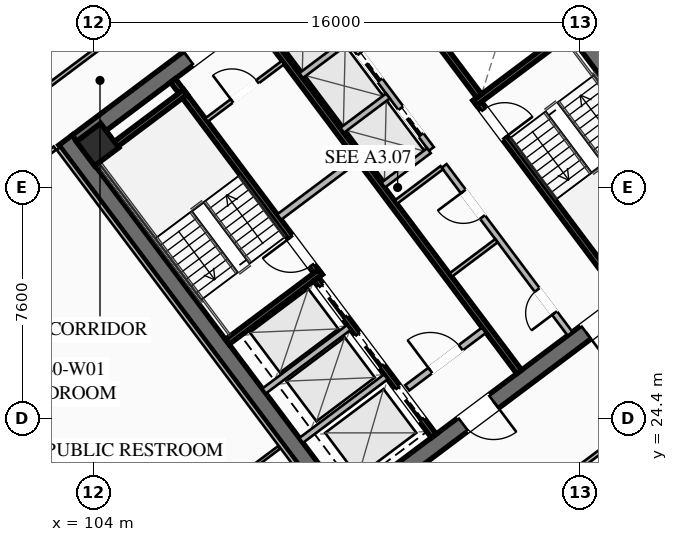
"""IFC4 building model, lengths in metres.
Left out: names, types, materials, properties, quantities, classifications, styles, units other than length and angle.
Written with IfcOpenShell. Run it as: python <this file> out.ifc"""

import sys

from ifc_helpers import new_model, si_unit, direction, frame, frame_2d, origin, origin_2d, place, context, subcontext, project, spatial, rectangle, hollow_rectangle, extrude, element, fill, save


model = new_model("IFC4")
c1 = context("Model", 3, precision=1e-05, world=origin(), true_north=direction((0.0, 1.0)))
c2 = subcontext(c1, "Body", "Model", "MODEL_VIEW")
j1 = project(units=[si_unit("LENGTHUNIT", "METRE"), si_unit("PLANEANGLEUNIT", "RADIAN")], contexts=[c1])
p1 = place(None, origin())
s1 = spatial("IfcSite", under=j1, at=p1, CompositionType="ELEMENT")
p2 = place(p1, origin())
s2 = spatial("IfcBuilding", under=s1, at=p2, CompositionType="ELEMENT")
p3 = place(p2, frame((0.0, 0.0, 149.9)))
s3 = spatial("IfcBuildingStorey", under=s2, at=p3, CompositionType="ELEMENT", Elevation=149.9)
for number, where, z_axis, x_axis in (
    (1, (112.436, 21.077, 0.0), (0.0, 0.0, 1.0), (-0.6, 0.8, 0.0)),
    (2, (115.564, 42.923, 0.0), (0.0, 0.0, 1.0), (0.6, -0.8, 0.0)),
):
    element("IfcWall", number, at=place(p3, frame(where, z_axis=z_axis, x_axis=x_axis)), inside=s3, PredefinedType="SHEAR", context=c2, shape_type="SweptSolid", body=[
        extrude(rectangle(XDim=15.6, YDim=0.55, at=frame_2d((7.8, 0.0))), origin(), (0.0, 0.0, 1.0), 3.55),
    ])
p4 = place(p3, frame((124.539, 30.498, 0.0), z_axis=(0.0, 0.0, 1.0), x_axis=(-0.799998054672, -0.600002593761, 0.0)))
e3 = element("IfcWall", 3, at=p4, inside=s3, PredefinedType="SHEAR", context=c2, shape_type="SweptSolid", body=[
    extrude(rectangle(XDim=15.06, YDim=0.55, at=frame_2d((7.53, 0.0))), origin(), (0.0, 0.0, 1.0), 3.55),
])
p5 = place(p4, frame((9.23, 0.0, 0.0)))
e4 = element("IfcOpeningElement", 4, at=p5, cuts=e3, PredefinedType="OPENING", context=c2, shape_type="SweptSolid", body=[
    extrude(rectangle(XDim=1.25, YDim=2.25, at=frame_2d((0.625, 1.125))), frame((0.0, 0.285, 0.0), z_axis=(0.0, -1.0, 0.0), x_axis=(1.0, 0.0, 0.0)), (0.0, 0.0, 1.0), 0.57),
])
p6 = place(p4, frame((4.18, 0.0, 0.0)))
e5 = element("IfcOpeningElement", 5, at=p6, cuts=e3, PredefinedType="OPENING", context=c2, shape_type="SweptSolid", body=[
    extrude(rectangle(XDim=1.25, YDim=2.25, at=frame_2d((0.625, 1.125))), frame((0.0, 0.285, 0.0), z_axis=(0.0, -1.0, 0.0), x_axis=(1.0, 0.0, 0.0)), (0.0, 0.0, 1.0), 0.57),
])
p7 = place(p3, frame((103.461, 33.502, 0.0), z_axis=(0.0, 0.0, 1.0), x_axis=(0.799998054672, 0.600002593761, 0.0)))
e6 = element("IfcWall", 6, at=p7, inside=s3, PredefinedType="SHEAR", context=c2, shape_type="SweptSolid", body=[
    extrude(rectangle(XDim=15.06, YDim=0.55, at=frame_2d((7.53, 0.0))), origin(), (0.0, 0.0, 1.0), 3.55),
])
p8 = place(p7, frame((4.58, 0.0, 0.0)))
e7 = element("IfcOpeningElement", 7, at=p8, cuts=e6, PredefinedType="OPENING", context=c2, shape_type="SweptSolid", body=[
    extrude(rectangle(XDim=1.25, YDim=2.25, at=frame_2d((0.625, 1.125))), frame((0.0, 0.285, 0.0), z_axis=(0.0, -1.0, 0.0), x_axis=(1.0, 0.0, 0.0)), (0.0, 0.0, 1.0), 0.57),
])
p9 = place(p7, frame((9.63, 0.0, 0.0)))
e8 = element("IfcOpeningElement", 8, at=p9, cuts=e6, PredefinedType="OPENING", context=c2, shape_type="SweptSolid", body=[
    extrude(rectangle(XDim=1.25, YDim=2.25, at=frame_2d((0.625, 1.125))), frame((0.0, 0.285, 0.0), z_axis=(0.0, -1.0, 0.0), x_axis=(1.0, 0.0, 0.0)), (0.0, 0.0, 1.0), 0.57),
])
p10 = place(p3, frame((104.13, 33.41, 0.0), z_axis=(0.0, 0.0, 1.0), x_axis=(0.799999996291, 0.600000004945, 0.0)))
e9 = element("IfcColumn", 9, at=p10, inside=s3, PredefinedType="COLUMN", context=c2, shape_type="SweptSolid", body=[
    extrude(hollow_rectangle(XDim=1.0, YDim=1.0, WallThickness=0.04, at=origin_2d()), origin(), (0.0, 0.0, 1.0), 3.37),
])
p11 = place(p3, frame((111.44, 29.08, 0.0), z_axis=(0.0, 0.0, 1.0), x_axis=(-0.59999029481, 0.8000072788, 0.0)))
e10 = element("IfcWall", 10, at=p11, inside=s3, PredefinedType="SHEAR", context=c2, shape_type="SweptSolid", body=[
    extrude(rectangle(XDim=8.05, YDim=0.2, at=frame_2d((4.025, 0.0))), origin(), (0.0, 0.0, 1.0), 3.37),
])
p12 = place(p11, frame((0.45, 0.0, 0.0)))
e11 = element("IfcOpeningElement", 11, at=p12, cuts=e10, PredefinedType="OPENING", context=c2, shape_type="SweptSolid", body=[
    extrude(rectangle(XDim=1.15, YDim=2.2, at=frame_2d((0.575, 1.1))), frame((0.0, 0.11, 0.0), z_axis=(0.0, -1.0, 0.0), x_axis=(1.0, 0.0, 0.0)), (0.0, 0.0, 1.0), 0.22),
])
for number, where, z_axis, x_axis in (
    (12, (108.396, 26.922, 0.0), (0.0, 0.0, 1.0), (0.8, 0.6, 0.0)),
    (13, (103.956, 32.842, 0.0), (0.0, 0.0, 1.0), (0.8, 0.6, 0.0)),
):
    element("IfcWall", number, at=place(p3, frame(where, z_axis=z_axis, x_axis=x_axis)), inside=s3, PredefinedType="SHEAR", context=c2, shape_type="SweptSolid", body=[
        extrude(rectangle(XDim=3.83, YDim=0.2, at=frame_2d((1.915, 0.0))), origin(), (0.0, 0.0, 1.0), 3.37),
    ])
p13 = place(p3, frame((116.56, 34.92, 0.0), z_axis=(0.0, 0.0, 1.0), x_axis=(0.59999029481, -0.8000072788, 0.0)))
e14 = element("IfcWall", 14, at=p13, inside=s3, PredefinedType="SHEAR", context=c2, shape_type="SweptSolid", body=[
    extrude(rectangle(XDim=8.05, YDim=0.2, at=frame_2d((4.025, 0.0))), origin(), (0.0, 0.0, 1.0), 3.37),
])
p14 = place(p13, frame((0.45, 0.0, 0.0)))
e15 = element("IfcOpeningElement", 15, at=p14, cuts=e14, PredefinedType="OPENING", context=c2, shape_type="SweptSolid", body=[
    extrude(rectangle(XDim=1.15, YDim=2.2, at=frame_2d((0.575, 1.1))), frame((0.0, 0.11, 0.0), z_axis=(0.0, -1.0, 0.0), x_axis=(1.0, 0.0, 0.0)), (0.0, 0.0, 1.0), 0.22),
])
p15 = place(p3, frame((116.54, 34.78, 0.0), z_axis=(0.0, 0.0, 1.0), x_axis=(0.800015298837, 0.599979601008, 0.0)))
e16 = element("IfcWall", 16, at=p15, inside=s3, PredefinedType="SHEAR", context=c2, shape_type="SweptSolid", body=[
    extrude(rectangle(XDim=3.83, YDim=0.2, at=frame_2d((1.915, 0.0))), origin(), (0.0, 0.0, 1.0), 3.37),
])
p16 = place(p3, frame((117.998, 25.936, 0.0), z_axis=(0.0, 0.0, 1.0), x_axis=(-0.600002693989, 0.799997979501, 0.0)))
e17 = element("IfcWall", 17, at=p16, inside=s3, PredefinedType="SHEAR", context=c2, shape_type="SweptSolid", body=[
    extrude(rectangle(XDim=14.5, YDim=0.2, at=frame_2d((7.25, 0.0))), origin(), (0.0, 0.0, 1.0), 3.37),
])
p17 = place(p3, frame((110.104, 31.028, 0.0), z_axis=(0.0, 0.0, 1.0), x_axis=(0.800018601094, 0.59997519774, 0.0)))
e18 = element("IfcWall", 18, at=p17, inside=s3, PredefinedType="SOLIDWALL", context=c2, shape_type="SweptSolid", body=[
    extrude(rectangle(XDim=3.15, YDim=0.22, at=frame_2d((1.575, 0.0))), origin(), (0.0, 0.0, 1.0), 2.723),
])
p18 = place(p3, frame((114.316, 25.412, 0.0), z_axis=(0.0, 0.0, 1.0), x_axis=(0.800018601094, 0.59997519774, 0.0)))
e19 = element("IfcWall", 19, at=p18, inside=s3, PredefinedType="SOLIDWALL", context=c2, shape_type="SweptSolid", body=[
    extrude(rectangle(XDim=3.15, YDim=0.22, at=frame_2d((1.575, 0.0))), origin(), (0.0, 0.0, 1.0), 2.723),
])
p19 = place(p18, frame((0.95, 0.0, 0.0)))
e20 = element("IfcOpeningElement", 20, at=p19, cuts=e19, PredefinedType="OPENING", context=c2, shape_type="SweptSolid", body=[
    extrude(rectangle(XDim=1.25, YDim=2.25, at=frame_2d((0.625, 1.125))), frame((0.0, 0.12, 0.0), z_axis=(0.0, -1.0, 0.0), x_axis=(1.0, 0.0, 0.0)), (0.0, 0.0, 1.0), 0.24),
])
p20 = place(p3, frame((115.19, 23.83, 0.0), z_axis=(0.0, 0.0, 1.0), x_axis=(-0.599993943644, 0.800004542231, 0.0)))
e21 = element("IfcWall", 21, at=p20, inside=s3, PredefinedType="SHEAR", context=c2, shape_type="SweptSolid", body=[
    extrude(rectangle(XDim=6.45, YDim=0.2, at=frame_2d((3.225, 0.0))), origin(), (0.0, 0.0, 1.0), 3.37),
])
p21 = place(p20, frame((4.875, 0.0, 0.0)))
e22 = element("IfcOpeningElement", 22, at=p21, cuts=e21, PredefinedType="OPENING", context=c2, shape_type="SweptSolid", body=[
    extrude(rectangle(XDim=1.3, YDim=2.25, at=frame_2d((0.65, 1.125))), frame((0.0, 0.11, 0.0), z_axis=(0.0, -1.0, 0.0), x_axis=(1.0, 0.0, 0.0)), (0.0, 0.0, 1.0), 0.22),
])
p22 = place(p20, frame((2.875, 0.0, 0.0)))
e23 = element("IfcOpeningElement", 23, at=p22, cuts=e21, PredefinedType="OPENING", context=c2, shape_type="SweptSolid", body=[
    extrude(rectangle(XDim=1.3, YDim=2.25, at=frame_2d((0.65, 1.125))), frame((0.0, 0.11, 0.0), z_axis=(0.0, -1.0, 0.0), x_axis=(1.0, 0.0, 0.0)), (0.0, 0.0, 1.0), 0.22),
])
p23 = place(p20, frame((0.675, 0.0, 0.0)))
e24 = element("IfcOpeningElement", 24, at=p23, cuts=e21, PredefinedType="OPENING", context=c2, shape_type="SweptSolid", body=[
    extrude(rectangle(XDim=1.3, YDim=2.25, at=frame_2d((0.65, 1.125))), frame((0.0, 0.11, 0.0), z_axis=(0.0, -1.0, 0.0), x_axis=(1.0, 0.0, 0.0)), (0.0, 0.0, 1.0), 0.22),
])
for number, where, z_axis, x_axis in (
    (25, (110.826, 23.682, 0.0), (0.0, 0.0, 1.0), (0.8, 0.6, 0.0)),
    (26, (109.608, 25.306, 0.0), (0.0, 0.0, 1.0), (0.8, 0.6, 0.0)),
):
    element("IfcWall", number, at=place(p3, frame(where, z_axis=z_axis, x_axis=x_axis)), inside=s3, PredefinedType="SOLIDWALL", context=c2, shape_type="SweptSolid", body=[
        extrude(rectangle(XDim=3.48, YDim=0.2, at=frame_2d((1.74, 0.0))), origin(), (0.0, 0.0, 1.0), 3.37),
    ])
p24 = place(p3, frame((112.81, 40.17, 0.0), z_axis=(0.0, 0.0, 1.0), x_axis=(0.599993943644, -0.800004542231, 0.0)))
e27 = element("IfcWall", 27, at=p24, inside=s3, PredefinedType="SHEAR", context=c2, shape_type="SweptSolid", body=[
    extrude(rectangle(XDim=6.45, YDim=0.2, at=frame_2d((3.225, 0.0))), origin(), (0.0, 0.0, 1.0), 3.37),
])
p25 = place(p3, frame((107.71, 34.22, 0.0), z_axis=(0.0, 0.0, 1.0), x_axis=(0.799981399002, 0.60002480053, 0.0)))
e28 = element("IfcWall", 28, at=p25, inside=s3, PredefinedType="PARTITIONING", context=c2, shape_type="SweptSolid", body=[
    extrude(rectangle(XDim=3.15, YDim=0.135, at=frame_2d((1.575, 0.0))), origin(), (0.0, 0.0, 1.0), 2.723),
])
p26 = place(p25, frame((1.05, 0.0, 0.0)))
e29 = element("IfcOpeningElement", 29, at=p26, cuts=e28, PredefinedType="OPENING", context=c2, shape_type="SweptSolid", body=[
    extrude(rectangle(XDim=1.05, YDim=2.2, at=frame_2d((0.525, 1.1))), frame((0.0, 0.077, 0.0), z_axis=(0.0, -1.0, 0.0), x_axis=(1.0, 0.0, 0.0)), (0.0, 0.0, 1.0), 0.155),
])
p27 = place(p3, frame((119.67, 27.19, 0.0), z_axis=(0.0, 0.0, 1.0), x_axis=(-0.599988677396, 0.800008491828, 0.0)))
e30 = element("IfcWall", 30, at=p27, inside=s3, PredefinedType="SOLIDWALL", context=c2, shape_type="SweptSolid", body=[
    extrude(rectangle(XDim=6.9, YDim=0.2, at=frame_2d((3.45, 0.0))), origin(), (0.0, 0.0, 1.0), 2.723),
])
p28 = place(p27, frame((0.85, 0.0, 0.0)))
e31 = element("IfcOpeningElement", 31, at=p28, cuts=e30, PredefinedType="OPENING", context=c2, shape_type="SweptSolid", body=[
    extrude(rectangle(XDim=0.95, YDim=2.05, at=frame_2d((0.475, 1.025))), frame((0.0, 0.11, 0.0), z_axis=(0.0, -1.0, 0.0), x_axis=(1.0, 0.0, 0.0)), (0.0, 0.0, 1.0), 0.22),
])
p29 = place(p27, frame((4.8, 0.0, 0.0)))
e32 = element("IfcOpeningElement", 32, at=p29, cuts=e30, PredefinedType="OPENING", context=c2, shape_type="SweptSolid", body=[
    extrude(rectangle(XDim=1.05, YDim=2.2, at=frame_2d((0.525, 1.1))), frame((0.0, 0.11, 0.0), z_axis=(0.0, -1.0, 0.0), x_axis=(1.0, 0.0, 0.0)), (0.0, 0.0, 1.0), 0.22),
])
for number, where, z_axis, x_axis in (
    (33, (113.946, 31.522, 0.0), (0.0, 0.0, 1.0), (0.8, 0.6, 0.0)),
    (34, (115.746, 29.122, 0.0), (0.0, 0.0, 1.0), (0.8, 0.6, 0.0)),
):
    element("IfcWall", number, at=place(p3, frame(where, z_axis=z_axis, x_axis=x_axis)), inside=s3, PredefinedType="PARTITIONING", context=c2, shape_type="SweptSolid", body=[
        extrude(rectangle(XDim=1.88, YDim=0.135, at=frame_2d((0.94, 0.0))), origin(), (0.0, 0.0, 1.0), 2.723),
    ])
p30 = place(p3, frame((115.11, 33.27, 0.0), z_axis=(0.0, 0.0, 1.0), x_axis=(-0.600011322243, 0.799991508192, 0.0)))
e35 = element("IfcWall", 35, at=p30, inside=s3, PredefinedType="SOLIDWALL", context=c2, shape_type="SweptSolid", body=[
    extrude(rectangle(XDim=6.9, YDim=0.2, at=frame_2d((3.45, 0.0))), origin(), (0.0, 0.0, 1.0), 3.37),
])
p31 = place(p30, frame((0.575, 0.0, 0.0)))
e36 = element("IfcOpeningElement", 36, at=p31, cuts=e35, PredefinedType="OPENING", context=c2, shape_type="SweptSolid", body=[
    extrude(rectangle(XDim=1.1, YDim=2.2, at=frame_2d((0.55, 1.1))), frame((0.0, 0.11, 0.0), z_axis=(0.0, -1.0, 0.0), x_axis=(1.0, 0.0, 0.0)), (0.0, 0.0, 1.0), 0.22),
])
p32 = place(p30, frame((2.825, 0.0, 0.0)))
e37 = element("IfcOpeningElement", 37, at=p32, cuts=e35, PredefinedType="OPENING", context=c2, shape_type="SweptSolid", body=[
    extrude(rectangle(XDim=1.1, YDim=2.2, at=frame_2d((0.55, 1.1))), frame((0.0, 0.11, 0.0), z_axis=(0.0, -1.0, 0.0), x_axis=(1.0, 0.0, 0.0)), (0.0, 0.0, 1.0), 0.22),
])
p33 = place(p30, frame((5.075, 0.0, 0.0)))
e38 = element("IfcOpeningElement", 38, at=p33, cuts=e35, PredefinedType="OPENING", context=c2, shape_type="SweptSolid", body=[
    extrude(rectangle(XDim=1.1, YDim=2.2, at=frame_2d((0.55, 1.1))), frame((0.0, 0.11, 0.0), z_axis=(0.0, -1.0, 0.0), x_axis=(1.0, 0.0, 0.0)), (0.0, 0.0, 1.0), 0.22),
])
p34 = place(p3, frame((113.526, 32.082, 0.0), z_axis=(0.0, 0.0, 1.0), x_axis=(0.800046745961, 0.599937666993, 0.0)))
e39 = element("IfcWall", 39, at=p34, inside=s3, PredefinedType="SOLIDWALL", context=c2, shape_type="SweptSolid", body=[
    extrude(rectangle(XDim=1.88, YDim=0.2, at=frame_2d((0.94, 0.0))), origin(), (0.0, 0.0, 1.0), 3.37),
])
p35 = place(p3, frame((112.176, 33.882, 0.0), z_axis=(0.0, 0.0, 1.0), x_axis=(0.8, 0.6, 0.0)))
e40 = element("IfcWall", 40, at=p35, inside=s3, PredefinedType="SOLIDWALL", context=c2, shape_type="SweptSolid", body=[
    extrude(rectangle(XDim=1.88, YDim=0.2, at=frame_2d((0.94, 0.0))), origin(), (0.0, 0.0, 1.0), 3.37),
])
p36 = place(p3, frame((110.826, 35.682, 0.0), z_axis=(0.0, 0.0, 1.0), x_axis=(0.799984418148, 0.600020775241, 0.0)))
e41 = element("IfcWall", 41, at=p36, inside=s3, PredefinedType="SOLIDWALL", context=c2, shape_type="SweptSolid", body=[
    extrude(rectangle(XDim=1.88, YDim=0.2, at=frame_2d((0.94, 0.0))), origin(), (0.0, 0.0, 1.0), 3.37),
])
p37 = place(p3, frame((95.738, 30.266, 0.0), z_axis=(0.0, 0.0, 1.0), x_axis=(0.800003744006, 0.59999500796, 0.0)))
e42 = element("IfcWall", 42, at=p37, inside=s3, PredefinedType="PARTITIONING", context=c2, shape_type="SweptSolid", body=[
    extrude(rectangle(XDim=31.3, YDim=0.135, at=frame_2d((15.65, 0.0))), origin(), (0.0, 0.0, 1.0), 2.723),
])
p38 = place(p37, frame((0.3, 0.0, 0.0)))
e43 = element("IfcOpeningElement", 43, at=p38, cuts=e42, PredefinedType="OPENING", context=c2, shape_type="SweptSolid", body=[
    extrude(rectangle(XDim=0.95, YDim=2.05, at=frame_2d((0.475, 1.025))), frame((0.0, 0.077, 0.0), z_axis=(0.0, -1.0, 0.0), x_axis=(1.0, 0.0, 0.0)), (0.0, 0.0, 1.0), 0.155),
])
p39 = place(p37, frame((15.493, 0.0, 0.0)))
e44 = element("IfcOpeningElement", 44, at=p39, cuts=e42, PredefinedType="OPENING", context=c2, shape_type="SweptSolid", body=[
    extrude(rectangle(XDim=0.95, YDim=2.05, at=frame_2d((0.475, 1.025))), frame((0.0, 0.077, 0.0), z_axis=(0.0, -1.0, 0.0), x_axis=(1.0, 0.0, 0.0)), (0.0, 0.0, 1.0), 0.155),
])
p40 = place(p37, frame((30.05, 0.0, 0.0)))
e45 = element("IfcOpeningElement", 45, at=p40, cuts=e42, PredefinedType="OPENING", context=c2, shape_type="SweptSolid", body=[
    extrude(rectangle(XDim=0.95, YDim=2.05, at=frame_2d((0.475, 1.025))), frame((0.0, 0.077, 0.0), z_axis=(0.0, -1.0, 0.0), x_axis=(1.0, 0.0, 0.0)), (0.0, 0.0, 1.0), 0.155),
])
p41 = place(p3, frame((133.09, 32.63, 0.0), z_axis=(0.0, 0.0, 1.0), x_axis=(-0.800003744006, -0.59999500796, 0.0)))
e46 = element("IfcWall", 46, at=p41, inside=s3, PredefinedType="PARTITIONING", context=c2, shape_type="SweptSolid", body=[
    extrude(rectangle(XDim=31.3, YDim=0.135, at=frame_2d((15.65, 0.0))), origin(), (0.0, 0.0, 1.0), 2.723),
])
p42 = place(p41, frame((29.97, 0.0, 0.0)))
e47 = element("IfcOpeningElement", 47, at=p42, cuts=e46, PredefinedType="OPENING", context=c2, shape_type="SweptSolid", body=[
    extrude(rectangle(XDim=0.95, YDim=2.05, at=frame_2d((0.475, 1.025))), frame((0.0, 0.077, 0.0), z_axis=(0.0, -1.0, 0.0), x_axis=(1.0, 0.0, 0.0)), (0.0, 0.0, 1.0), 0.155),
])
p43 = place(p41, frame((18.914, 0.0, 0.0)))
e48 = element("IfcOpeningElement", 48, at=p43, cuts=e46, PredefinedType="OPENING", context=c2, shape_type="SweptSolid", body=[
    extrude(rectangle(XDim=0.95, YDim=2.05, at=frame_2d((0.475, 1.025))), frame((0.0, 0.077, 0.0), z_axis=(0.0, -1.0, 0.0), x_axis=(1.0, 0.0, 0.0)), (0.0, 0.0, 1.0), 0.155),
])
p44 = place(p41, frame((0.38, 0.0, 0.0)))
e49 = element("IfcOpeningElement", 49, at=p44, cuts=e46, PredefinedType="OPENING", context=c2, shape_type="SweptSolid", body=[
    extrude(rectangle(XDim=0.95, YDim=2.05, at=frame_2d((0.475, 1.025))), frame((0.0, 0.077, 0.0), z_axis=(0.0, -1.0, 0.0), x_axis=(1.0, 0.0, 0.0)), (0.0, 0.0, 1.0), 0.155),
])
p45 = place(p3, frame((112.104, 20.928, 0.0), z_axis=(0.0, 0.0, 1.0), x_axis=(-0.599994940075, 0.800003794918, 0.0)))
e50 = element("IfcWall", 50, at=p45, inside=s3, PredefinedType="PARTITIONING", context=c2, shape_type="SweptSolid", body=[
    extrude(rectangle(XDim=15.44, YDim=0.135, at=frame_2d((7.72, 0.0))), origin(), (0.0, 0.0, 1.0), 2.723),
])
p46 = place(p3, frame((102.728, 33.296, 0.0), z_axis=(0.0, 0.0, 1.0), x_axis=(-0.800002918023, -0.599996109283, 0.0)))
e51 = element("IfcWall", 51, at=p46, inside=s3, PredefinedType="PARTITIONING", context=c2, shape_type="SweptSolid", body=[
    extrude(rectangle(XDim=10.04, YDim=0.135, at=frame_2d((5.02, 0.0))), origin(), (0.0, 0.0, 1.0), 2.723),
])
p47 = place(p46, frame((0.5, 0.0, 0.0)))
e52 = element("IfcOpeningElement", 52, at=p47, cuts=e51, PredefinedType="OPENING", context=c2, shape_type="SweptSolid", body=[
    extrude(rectangle(XDim=0.95, YDim=2.05, at=frame_2d((0.475, 1.025))), frame((0.0, 0.077, 0.0), z_axis=(0.0, -1.0, 0.0), x_axis=(1.0, 0.0, 0.0)), (0.0, 0.0, 1.0), 0.155),
])
p48 = place(p3, frame((102.076, 17.432, 0.0), z_axis=(0.0, 0.0, 1.0), x_axis=(0.799991245945, 0.600011671896, 0.0)))
e53 = element("IfcWall", 53, at=p48, inside=s3, PredefinedType="PARTITIONING", context=c2, shape_type="SweptSolid", body=[
    extrude(rectangle(XDim=10.04, YDim=0.11, at=frame_2d((5.02, 0.0))), origin(), (0.0, 0.0, 1.0), 2.723),
])
p49 = place(p8, origin())
e54 = element("IfcDoor", 54, at=p49, inside=s3, OperationType="SINGLE_SWING_LEFT", PredefinedType="DOOR", context=c2, shape_type="SweptSolid", body=[
    extrude(rectangle(XDim=1.25, YDim=2.25, at=frame_2d((0.625, 1.125))), frame((0.0, 0.025, 0.0), z_axis=(0.0, -1.0, 0.0), x_axis=(1.0, 0.0, 0.0)), (0.0, 0.0, 1.0), 0.05),
])
fill(e7, e54)
p50 = place(p5, origin())
e55 = element("IfcDoor", 55, at=p50, inside=s3, OperationType="SINGLE_SWING_LEFT", PredefinedType="DOOR", context=c2, shape_type="SweptSolid", body=[
    extrude(rectangle(XDim=1.25, YDim=2.25, at=frame_2d((0.625, 1.125))), frame((0.0, 0.025, 0.0), z_axis=(0.0, -1.0, 0.0), x_axis=(1.0, 0.0, 0.0)), (0.0, 0.0, 1.0), 0.05),
])
fill(e4, e55)
p51 = place(p6, origin())
e56 = element("IfcDoor", 56, at=p51, inside=s3, OperationType="SINGLE_SWING_RIGHT", PredefinedType="DOOR", context=c2, shape_type="SweptSolid", body=[
    extrude(rectangle(XDim=1.25, YDim=2.25, at=frame_2d((0.625, 1.125))), frame((0.0, 0.025, 0.0), z_axis=(0.0, -1.0, 0.0), x_axis=(1.0, 0.0, 0.0)), (0.0, 0.0, 1.0), 0.05),
])
fill(e5, e56)
p52 = place(p12, origin())
e57 = element("IfcDoor", 57, at=p52, inside=s3, OperationType="SINGLE_SWING_RIGHT", PredefinedType="DOOR", context=c2, shape_type="SweptSolid", body=[
    extrude(rectangle(XDim=1.15, YDim=2.2, at=frame_2d((0.575, 1.1))), frame((0.0, 0.025, 0.0), z_axis=(0.0, -1.0, 0.0), x_axis=(1.0, 0.0, 0.0)), (0.0, 0.0, 1.0), 0.05),
])
fill(e11, e57)
p53 = place(p14, origin())
e58 = element("IfcDoor", 58, at=p53, inside=s3, OperationType="SINGLE_SWING_RIGHT", PredefinedType="DOOR", context=c2, shape_type="SweptSolid", body=[
    extrude(rectangle(XDim=1.15, YDim=2.2, at=frame_2d((0.575, 1.1))), frame((0.0, 0.025, 0.0), z_axis=(0.0, -1.0, 0.0), x_axis=(1.0, 0.0, 0.0)), (0.0, 0.0, 1.0), 0.05),
])
fill(e15, e58)
p54 = place(p19, origin())
e59 = element("IfcDoor", 59, at=p54, inside=s3, OperationType="SINGLE_SWING_LEFT", PredefinedType="DOOR", context=c2, shape_type="SweptSolid", body=[
    extrude(rectangle(XDim=1.25, YDim=2.25, at=frame_2d((0.625, 1.125))), frame((0.0, 0.025, 0.0), z_axis=(0.0, -1.0, 0.0), x_axis=(1.0, 0.0, 0.0)), (0.0, 0.0, 1.0), 0.05),
])
fill(e20, e59)
p55 = place(p26, origin())
e60 = element("IfcDoor", 60, at=p55, inside=s3, OperationType="SINGLE_SWING_LEFT", PredefinedType="DOOR", context=c2, shape_type="SweptSolid", body=[
    extrude(rectangle(XDim=1.05, YDim=2.2, at=frame_2d((0.525, 1.1))), frame((0.0, 0.025, 0.0), z_axis=(0.0, -1.0, 0.0), x_axis=(1.0, 0.0, 0.0)), (0.0, 0.0, 1.0), 0.05),
])
fill(e29, e60)
p56 = place(p28, origin())
e61 = element("IfcDoor", 61, at=p56, inside=s3, OperationType="SINGLE_SWING_LEFT", PredefinedType="DOOR", context=c2, shape_type="SweptSolid", body=[
    extrude(rectangle(XDim=0.95, YDim=2.05, at=frame_2d((0.475, 1.025))), frame((0.0, 0.025, 0.0), z_axis=(0.0, -1.0, 0.0), x_axis=(1.0, 0.0, 0.0)), (0.0, 0.0, 1.0), 0.05),
])
fill(e31, e61)
p57 = place(p29, origin())
e62 = element("IfcDoor", 62, at=p57, inside=s3, OperationType="SINGLE_SWING_RIGHT", PredefinedType="DOOR", context=c2, shape_type="SweptSolid", body=[
    extrude(rectangle(XDim=1.05, YDim=2.2, at=frame_2d((0.525, 1.1))), frame((0.0, 0.025, 0.0), z_axis=(0.0, -1.0, 0.0), x_axis=(1.0, 0.0, 0.0)), (0.0, 0.0, 1.0), 0.05),
])
fill(e32, e62)
p58 = place(p21, origin())
e63 = element("IfcDoor", 63, at=p58, inside=s3, OperationType="SLIDING_TO_LEFT", PredefinedType="DOOR", context=c2, shape_type="SweptSolid", body=[
    extrude(rectangle(XDim=1.3, YDim=2.25, at=frame_2d((0.65, 1.125))), frame((0.0, 0.025, 0.0), z_axis=(0.0, -1.0, 0.0), x_axis=(1.0, 0.0, 0.0)), (0.0, 0.0, 1.0), 0.05),
])
fill(e22, e63)
p59 = place(p22, origin())
e64 = element("IfcDoor", 64, at=p59, inside=s3, OperationType="SLIDING_TO_LEFT", PredefinedType="DOOR", context=c2, shape_type="SweptSolid", body=[
    extrude(rectangle(XDim=1.3, YDim=2.25, at=frame_2d((0.65, 1.125))), frame((0.0, 0.025, 0.0), z_axis=(0.0, -1.0, 0.0), x_axis=(1.0, 0.0, 0.0)), (0.0, 0.0, 1.0), 0.05),
])
fill(e23, e64)
p60 = place(p23, origin())
e65 = element("IfcDoor", 65, at=p60, inside=s3, OperationType="SLIDING_TO_LEFT", PredefinedType="DOOR", context=c2, shape_type="SweptSolid", body=[
    extrude(rectangle(XDim=1.3, YDim=2.25, at=frame_2d((0.65, 1.125))), frame((0.0, 0.025, 0.0), z_axis=(0.0, -1.0, 0.0), x_axis=(1.0, 0.0, 0.0)), (0.0, 0.0, 1.0), 0.05),
])
fill(e24, e65)
p61 = place(p31, origin())
e66 = element("IfcDoor", 66, at=p61, inside=s3, OperationType="SLIDING_TO_LEFT", PredefinedType="DOOR", context=c2, shape_type="SweptSolid", body=[
    extrude(rectangle(XDim=1.1, YDim=2.2, at=frame_2d((0.55, 1.1))), frame((0.0, 0.025, 0.0), z_axis=(0.0, -1.0, 0.0), x_axis=(1.0, 0.0, 0.0)), (0.0, 0.0, 1.0), 0.05),
])
fill(e36, e66)
p62 = place(p32, origin())
e67 = element("IfcDoor", 67, at=p62, inside=s3, OperationType="SLIDING_TO_LEFT", PredefinedType="DOOR", context=c2, shape_type="SweptSolid", body=[
    extrude(rectangle(XDim=1.1, YDim=2.2, at=frame_2d((0.55, 1.1))), frame((0.0, 0.025, 0.0), z_axis=(0.0, -1.0, 0.0), x_axis=(1.0, 0.0, 0.0)), (0.0, 0.0, 1.0), 0.05),
])
fill(e37, e67)
save(model, sys.argv[1])
